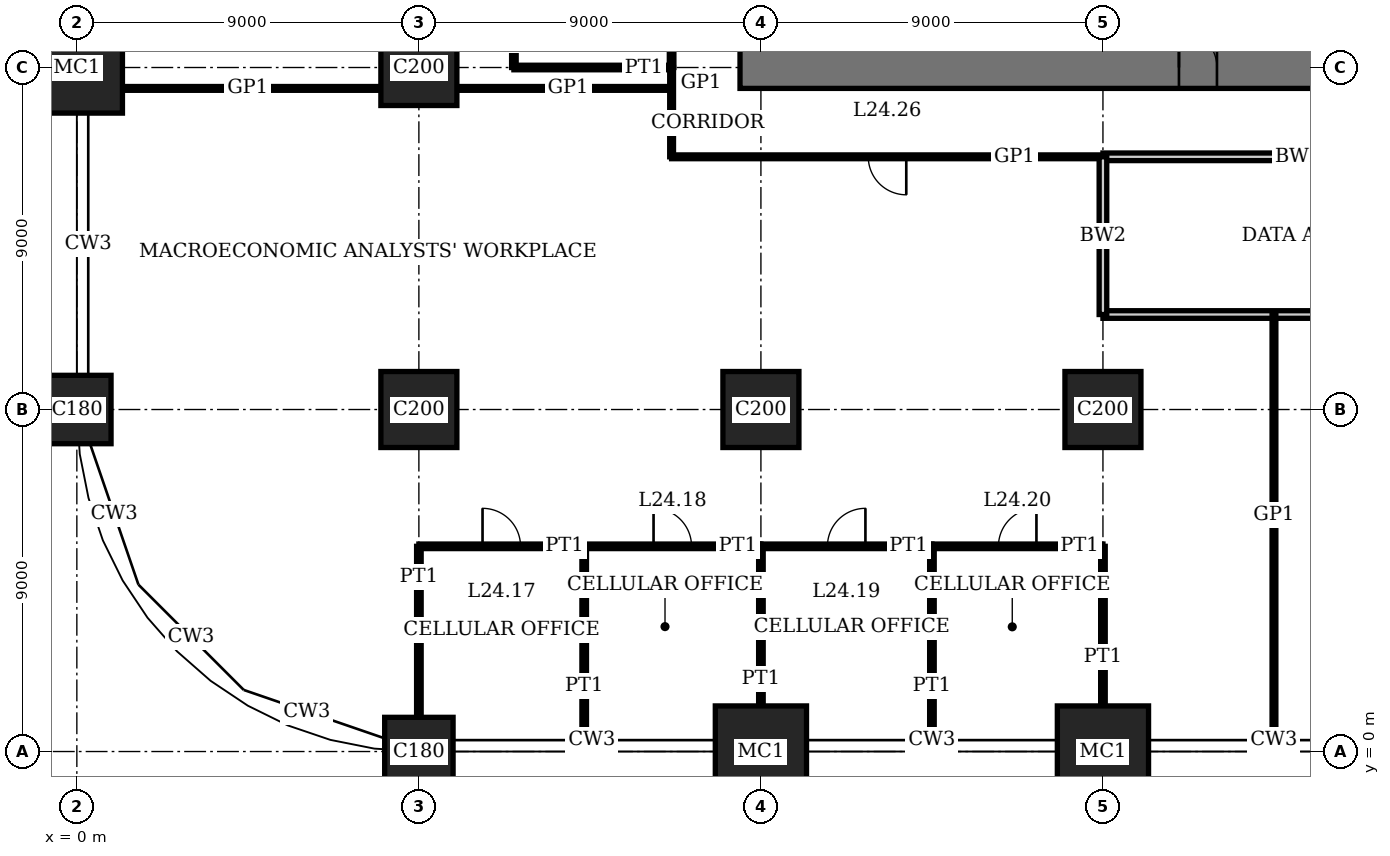
"""IFC4 building model, lengths in metres.
Left out: names, types, materials, properties, quantities, classifications, styles, units other than length and angle.
Written with IfcOpenShell. Run it as: python <this file> out.ifc"""

import sys

from ifc_helpers import new_model, si_unit, direction, frame, frame_2d, origin, origin_2d, place, context, subcontext, project, spatial, rectangle, extrude, element, fill, save


model = new_model("IFC4")
c1 = context("Model", 3, precision=1e-05, world=origin(), true_north=direction((0.0, 1.0)))
c2 = subcontext(c1, "Body", "Model", "MODEL_VIEW")
j1 = project(units=[si_unit("LENGTHUNIT", "METRE"), si_unit("PLANEANGLEUNIT", "RADIAN")], contexts=[c1])
p1 = place(None, origin())
s1 = spatial("IfcSite", under=j1, at=p1, CompositionType="ELEMENT")
p2 = place(p1, origin())
s2 = spatial("IfcBuilding", under=s1, at=p2, CompositionType="ELEMENT")
p3 = place(p2, frame((0.0, 0.0, 101.0)))
s3 = spatial("IfcBuildingStorey", under=s2, at=p3, CompositionType="ELEMENT", Elevation=101.0)
p4 = place(p3, frame((0.0, 9.0, 0.0), z_axis=(0.0, 0.0, 1.0), x_axis=(1.0, 0.0, 0.0)))
e1 = element("IfcColumn", 1, at=p4, inside=s3, PredefinedType="COLUMN", context=c2, shape_type="SweptSolid", body=[
    extrude(rectangle(XDim=1.8, YDim=1.8, at=origin_2d()), origin(), (0.0, 0.0, 1.0), 4.0),
])
p5 = place(p3, frame((0.0, 18.0, 0.0), z_axis=(0.0, 0.0, 1.0), x_axis=(1.0, 0.0, 0.0)))
e2 = element("IfcColumn", 2, at=p5, inside=s3, PredefinedType="COLUMN", context=c2, shape_type="SweptSolid", body=[
    extrude(rectangle(XDim=2.4, YDim=2.4, at=origin_2d()), origin(), (0.0, 0.0, 1.0), 4.0),
])
p6 = place(p3, frame((9.0, 0.0, 0.0), z_axis=(0.0, 0.0, 1.0), x_axis=(1.0, 0.0, 0.0)))
e3 = element("IfcColumn", 3, at=p6, inside=s3, PredefinedType="COLUMN", context=c2, shape_type="SweptSolid", body=[
    extrude(rectangle(XDim=1.8, YDim=1.8, at=origin_2d()), origin(), (0.0, 0.0, 1.0), 4.0),
])
for number, where, z_axis, x_axis in (
    (4, (9.0, 9.0, 0.0), (0.0, 0.0, 1.0), (1.0, 0.0, 0.0)),
    (5, (9.0, 18.0, 0.0), (0.0, 0.0, 1.0), (1.0, 0.0, 0.0)),
):
    element("IfcColumn", number, at=place(p3, frame(where, z_axis=z_axis, x_axis=x_axis)), inside=s3, PredefinedType="COLUMN", context=c2, shape_type="SweptSolid", body=[
        extrude(rectangle(XDim=2.0, YDim=2.0, at=origin_2d()), origin(), (0.0, 0.0, 1.0), 4.0),
    ])
p7 = place(p3, frame((18.0, 0.0, 0.0), z_axis=(0.0, 0.0, 1.0), x_axis=(1.0, 0.0, 0.0)))
e6 = element("IfcColumn", 6, at=p7, inside=s3, PredefinedType="COLUMN", context=c2, shape_type="SweptSolid", body=[
    extrude(rectangle(XDim=2.4, YDim=2.4, at=origin_2d()), origin(), (0.0, 0.0, 1.0), 4.0),
])
p8 = place(p3, frame((18.0, 9.0, 0.0), z_axis=(0.0, 0.0, 1.0), x_axis=(1.0, 0.0, 0.0)))
e7 = element("IfcColumn", 7, at=p8, inside=s3, PredefinedType="COLUMN", context=c2, shape_type="SweptSolid", body=[
    extrude(rectangle(XDim=2.0, YDim=2.0, at=origin_2d()), origin(), (0.0, 0.0, 1.0), 4.0),
])
p9 = place(p3, frame((27.0, 0.0, 0.0), z_axis=(0.0, 0.0, 1.0), x_axis=(1.0, 0.0, 0.0)))
e8 = element("IfcColumn", 8, at=p9, inside=s3, PredefinedType="COLUMN", context=c2, shape_type="SweptSolid", body=[
    extrude(rectangle(XDim=2.4, YDim=2.4, at=origin_2d()), origin(), (0.0, 0.0, 1.0), 4.0),
])
p10 = place(p3, frame((27.0, 9.0, 0.0), z_axis=(0.0, 0.0, 1.0), x_axis=(1.0, 0.0, 0.0)))
e9 = element("IfcColumn", 9, at=p10, inside=s3, PredefinedType="COLUMN", context=c2, shape_type="SweptSolid", body=[
    extrude(rectangle(XDim=2.0, YDim=2.0, at=origin_2d()), origin(), (0.0, 0.0, 1.0), 4.0),
])
p11 = place(p3, frame((17.45, 18.0, 0.0), z_axis=(0.0, 0.0, 1.0), x_axis=(1.0, 0.0, 0.0)))
e10 = element("IfcWall", 10, at=p11, inside=s3, PredefinedType="SHEAR", context=c2, shape_type="SweptSolid", body=[
    extrude(rectangle(XDim=28.1, YDim=1.1, at=frame_2d((14.05, 0.0))), origin(), (0.0, 0.0, 1.0), 4.0),
])
p12 = place(p11, frame((11.55, 0.0, 0.0)))
e11 = element("IfcOpeningElement", 11, at=p12, cuts=e10, PredefinedType="OPENING", context=c2, shape_type="SweptSolid", body=[
    extrude(rectangle(XDim=1.0, YDim=2.4, at=frame_2d((0.5, 1.2))), frame((0.0, 0.56, 0.0), z_axis=(0.0, -1.0, 0.0), x_axis=(1.0, 0.0, 0.0)), (0.0, 0.0, 1.0), 1.12),
])
p13 = place(p11, frame((16.55, 0.0, 0.0)))
e12 = element("IfcOpeningElement", 12, at=p13, cuts=e10, PredefinedType="OPENING", context=c2, shape_type="SweptSolid", body=[
    extrude(rectangle(XDim=1.0, YDim=2.4, at=frame_2d((0.5, 1.2))), frame((0.0, 0.56, 0.0), z_axis=(0.0, -1.0, 0.0), x_axis=(1.0, 0.0, 0.0)), (0.0, 0.0, 1.0), 1.12),
])
p14 = place(p11, frame((20.0, 0.0, 0.0)))
e13 = element("IfcOpeningElement", 13, at=p14, cuts=e10, PredefinedType="OPENING", context=c2, shape_type="SweptSolid", body=[
    extrude(rectangle(XDim=1.1, YDim=2.4, at=frame_2d((0.55, 1.2))), frame((0.0, 0.56, 0.0), z_axis=(0.0, -1.0, 0.0), x_axis=(1.0, 0.0, 0.0)), (0.0, 0.0, 1.0), 1.12),
])
p15 = place(p11, frame((24.05, 0.0, 0.0)))
e14 = element("IfcOpeningElement", 14, at=p15, cuts=e10, PredefinedType="OPENING", context=c2, shape_type="SweptSolid", body=[
    extrude(rectangle(XDim=1.0, YDim=2.4, at=frame_2d((0.5, 1.2))), frame((0.0, 0.56, 0.0), z_axis=(0.0, -1.0, 0.0), x_axis=(1.0, 0.0, 0.0)), (0.0, 0.0, 1.0), 1.12),
])
p16 = place(p3, frame((9.0, 5.4, 0.0), z_axis=(0.0, 0.0, 1.0), x_axis=(1.0, 0.0, 0.0)))
e15 = element("IfcWall", 15, at=p16, inside=s3, PredefinedType="PARTITIONING", context=c2, shape_type="SweptSolid", body=[
    extrude(rectangle(XDim=4.35, YDim=0.12, at=frame_2d((2.175, 0.0))), origin(), (0.0, 0.0, 1.0), 3.75),
])
p17 = place(p16, frame((1.675, 0.0, 0.0)))
e16 = element("IfcOpeningElement", 16, at=p17, cuts=e15, PredefinedType="OPENING", context=c2, shape_type="SweptSolid", body=[
    extrude(rectangle(XDim=1.0, YDim=2.4, at=frame_2d((0.5, 1.2))), frame((0.0, 0.07, 0.0), z_axis=(0.0, -1.0, 0.0), x_axis=(1.0, 0.0, 0.0)), (0.0, 0.0, 1.0), 0.14),
])
p18 = place(p3, frame((13.35, 5.4, 0.0), z_axis=(0.0, 0.0, 1.0), x_axis=(1.0, 0.0, 0.0)))
e17 = element("IfcWall", 17, at=p18, inside=s3, PredefinedType="PARTITIONING", context=c2, shape_type="SweptSolid", body=[
    extrude(rectangle(XDim=4.65, YDim=0.12, at=frame_2d((2.325, 0.0))), origin(), (0.0, 0.0, 1.0), 3.75),
])
p19 = place(p18, frame((1.825, 0.0, 0.0)))
e18 = element("IfcOpeningElement", 18, at=p19, cuts=e17, PredefinedType="OPENING", context=c2, shape_type="SweptSolid", body=[
    extrude(rectangle(XDim=1.0, YDim=2.4, at=frame_2d((0.5, 1.2))), frame((0.0, 0.07, 0.0), z_axis=(0.0, -1.0, 0.0), x_axis=(1.0, 0.0, 0.0)), (0.0, 0.0, 1.0), 0.14),
])
p20 = place(p3, frame((18.0, 5.4, 0.0), z_axis=(0.0, 0.0, 1.0), x_axis=(1.0, 0.0, 0.0)))
e19 = element("IfcWall", 19, at=p20, inside=s3, PredefinedType="PARTITIONING", context=c2, shape_type="SweptSolid", body=[
    extrude(rectangle(XDim=4.5, YDim=0.12, at=frame_2d((2.25, 0.0))), origin(), (0.0, 0.0, 1.0), 3.75),
])
p21 = place(p20, frame((1.75, 0.0, 0.0)))
e20 = element("IfcOpeningElement", 20, at=p21, cuts=e19, PredefinedType="OPENING", context=c2, shape_type="SweptSolid", body=[
    extrude(rectangle(XDim=1.0, YDim=2.4, at=frame_2d((0.5, 1.2))), frame((0.0, 0.07, 0.0), z_axis=(0.0, -1.0, 0.0), x_axis=(1.0, 0.0, 0.0)), (0.0, 0.0, 1.0), 0.14),
])
p22 = place(p3, frame((22.5, 5.4, 0.0), z_axis=(0.0, 0.0, 1.0), x_axis=(1.0, 0.0, 0.0)))
e21 = element("IfcWall", 21, at=p22, inside=s3, PredefinedType="PARTITIONING", context=c2, shape_type="SweptSolid", body=[
    extrude(rectangle(XDim=4.5, YDim=0.12, at=frame_2d((2.25, 0.0))), origin(), (0.0, 0.0, 1.0), 3.75),
])
p23 = place(p22, frame((1.75, 0.0, 0.0)))
e22 = element("IfcOpeningElement", 22, at=p23, cuts=e21, PredefinedType="OPENING", context=c2, shape_type="SweptSolid", body=[
    extrude(rectangle(XDim=1.0, YDim=2.4, at=frame_2d((0.5, 1.2))), frame((0.0, 0.07, 0.0), z_axis=(0.0, -1.0, 0.0), x_axis=(1.0, 0.0, 0.0)), (0.0, 0.0, 1.0), 0.14),
])
p24 = place(p3, frame((27.0, 11.5, 0.0), z_axis=(0.0, 0.0, 1.0), x_axis=(1.0, 0.0, 0.0)))
e23 = element("IfcWall", 23, at=p24, inside=s3, PredefinedType="SOLIDWALL", context=c2, shape_type="SweptSolid", body=[
    extrude(rectangle(XDim=13.5, YDim=0.2, at=frame_2d((6.75, 0.0))), origin(), (0.0, 0.0, 1.0), 3.75),
])
p25 = place(p24, frame((6.25, 0.0, 0.0)))
e24 = element("IfcOpeningElement", 24, at=p25, cuts=e23, PredefinedType="OPENING", context=c2, shape_type="SweptSolid", body=[
    extrude(rectangle(XDim=1.0, YDim=2.4, at=frame_2d((0.5, 1.2))), frame((0.0, 0.11, 0.0), z_axis=(0.0, -1.0, 0.0), x_axis=(1.0, 0.0, 0.0)), (0.0, 0.0, 1.0), 0.22),
])
p26 = place(p3, frame((27.0, 15.65, 0.0), z_axis=(0.0, 0.0, 1.0), x_axis=(1.0, 0.0, 0.0)))
e25 = element("IfcWall", 25, at=p26, inside=s3, PredefinedType="SOLIDWALL", context=c2, shape_type="SweptSolid", body=[
    extrude(rectangle(XDim=13.5, YDim=0.2, at=frame_2d((6.75, 0.0))), origin(), (0.0, 0.0, 1.0), 3.75),
])
p27 = place(p3, frame((15.65, 15.65, 0.0), z_axis=(0.0, 0.0, 1.0), x_axis=(1.0, 0.0, 0.0)))
e26 = element("IfcWall", 26, at=p27, inside=s3, PredefinedType="PARTITIONING", context=c2, shape_type="SweptSolid", body=[
    extrude(rectangle(XDim=11.35, YDim=0.1, at=frame_2d((5.675, 0.0))), origin(), (0.0, 0.0, 1.0), 3.75),
])
p28 = place(p27, frame((5.175, 0.0, 0.0)))
e27 = element("IfcOpeningElement", 27, at=p28, cuts=e26, PredefinedType="OPENING", context=c2, shape_type="SweptSolid", body=[
    extrude(rectangle(XDim=1.0, YDim=2.4, at=frame_2d((0.5, 1.2))), frame((0.0, 0.06, 0.0), z_axis=(0.0, -1.0, 0.0), x_axis=(1.0, 0.0, 0.0)), (0.0, 0.0, 1.0), 0.12),
])
p29 = place(p3, frame((1.2, 17.45, 0.0), z_axis=(0.0, 0.0, 1.0), x_axis=(1.0, 0.0, 0.0)))
e28 = element("IfcWall", 28, at=p29, inside=s3, PredefinedType="PARTITIONING", context=c2, shape_type="SweptSolid", body=[
    extrude(rectangle(XDim=6.8, YDim=0.1, at=frame_2d((3.4, 0.0))), origin(), (0.0, 0.0, 1.0), 3.75),
])
p30 = place(p3, frame((10.0, 17.45, 0.0), z_axis=(0.0, 0.0, 1.0), x_axis=(1.0, 0.0, 0.0)))
e29 = element("IfcWall", 29, at=p30, inside=s3, PredefinedType="PARTITIONING", context=c2, shape_type="SweptSolid", body=[
    extrude(rectangle(XDim=5.65, YDim=0.1, at=frame_2d((2.825, 0.0))), origin(), (0.0, 0.0, 1.0), 3.75),
])
p31 = place(p3, frame((11.5, 18.0, 0.0), z_axis=(0.0, 0.0, 1.0), x_axis=(1.0, 0.0, 0.0)))
e30 = element("IfcWall", 30, at=p31, inside=s3, PredefinedType="PARTITIONING", context=c2, shape_type="SweptSolid", body=[
    extrude(rectangle(XDim=4.15, YDim=0.12, at=frame_2d((2.075, 0.0))), origin(), (0.0, 0.0, 1.0), 3.05),
])
p32 = place(p3, frame((9.0, 0.9, 0.0), z_axis=(0.0, 0.0, 1.0), x_axis=(0.0, 1.0, 0.0)))
e31 = element("IfcWall", 31, at=p32, inside=s3, PredefinedType="PARTITIONING", context=c2, shape_type="SweptSolid", body=[
    extrude(rectangle(XDim=4.5, YDim=0.12, at=frame_2d((2.25, 0.0))), origin(), (0.0, 0.0, 1.0), 3.05),
])
p33 = place(p3, frame((11.5, 18.0, 0.0), z_axis=(0.0, 0.0, 1.0), x_axis=(0.0, 1.0, 0.0)))
e32 = element("IfcWall", 32, at=p33, inside=s3, PredefinedType="PARTITIONING", context=c2, shape_type="SweptSolid", body=[
    extrude(rectangle(XDim=4.5, YDim=0.12, at=frame_2d((2.25, 0.0))), origin(), (0.0, 0.0, 1.0), 3.75),
])
p34 = place(p33, frame((1.75, 0.0, 0.0)))
e33 = element("IfcOpeningElement", 33, at=p34, cuts=e32, PredefinedType="OPENING", context=c2, shape_type="SweptSolid", body=[
    extrude(rectangle(XDim=1.0, YDim=2.4, at=frame_2d((0.5, 1.2))), frame((0.0, 0.07, 0.0), z_axis=(0.0, -1.0, 0.0), x_axis=(1.0, 0.0, 0.0)), (0.0, 0.0, 1.0), 0.14),
])
p35 = place(p3, frame((13.35, 0.31, 0.0), z_axis=(0.0, 0.0, 1.0), x_axis=(0.0, 1.0, 0.0)))
e34 = element("IfcWall", 34, at=p35, inside=s3, PredefinedType="PARTITIONING", context=c2, shape_type="SweptSolid", body=[
    extrude(rectangle(XDim=5.09, YDim=0.12, at=frame_2d((2.545, 0.0))), origin(), (0.0, 0.0, 1.0), 3.75),
])
p36 = place(p3, frame((15.65, 18.0, 0.0), z_axis=(0.0, 0.0, 1.0), x_axis=(0.0, 1.0, 0.0)))
e35 = element("IfcWall", 35, at=p36, inside=s3, PredefinedType="PARTITIONING", context=c2, shape_type="SweptSolid", body=[
    extrude(rectangle(XDim=4.5, YDim=0.12, at=frame_2d((2.25, 0.0))), origin(), (0.0, 0.0, 1.0), 3.75),
])
p37 = place(p3, frame((15.65, 15.65, 0.0), z_axis=(0.0, 0.0, 1.0), x_axis=(0.0, 1.0, 0.0)))
e36 = element("IfcWall", 36, at=p37, inside=s3, PredefinedType="PARTITIONING", context=c2, shape_type="SweptSolid", body=[
    extrude(rectangle(XDim=2.35, YDim=0.1, at=frame_2d((1.175, 0.0))), origin(), (0.0, 0.0, 1.0), 3.75),
])
p38 = place(p3, frame((18.0, 1.2, 0.0), z_axis=(0.0, 0.0, 1.0), x_axis=(0.0, 1.0, 0.0)))
e37 = element("IfcWall", 37, at=p38, inside=s3, PredefinedType="PARTITIONING", context=c2, shape_type="SweptSolid", body=[
    extrude(rectangle(XDim=4.2, YDim=0.12, at=frame_2d((2.1, 0.0))), origin(), (0.0, 0.0, 1.0), 3.05),
])
p39 = place(p3, frame((22.5, 0.31, 0.0), z_axis=(0.0, 0.0, 1.0), x_axis=(0.0, 1.0, 0.0)))
e38 = element("IfcWall", 38, at=p39, inside=s3, PredefinedType="PARTITIONING", context=c2, shape_type="SweptSolid", body=[
    extrude(rectangle(XDim=5.09, YDim=0.12, at=frame_2d((2.545, 0.0))), origin(), (0.0, 0.0, 1.0), 3.75),
])
p40 = place(p3, frame((27.0, 11.5, 0.0), z_axis=(0.0, 0.0, 1.0), x_axis=(0.0, 1.0, 0.0)))
e39 = element("IfcWall", 39, at=p40, inside=s3, PredefinedType="SOLIDWALL", context=c2, shape_type="SweptSolid", body=[
    extrude(rectangle(XDim=4.15, YDim=0.2, at=frame_2d((2.075, 0.0))), origin(), (0.0, 0.0, 1.0), 3.05),
])
p41 = place(p3, frame((27.0, 1.2, 0.0), z_axis=(0.0, 0.0, 1.0), x_axis=(0.0, 1.0, 0.0)))
e40 = element("IfcWall", 40, at=p41, inside=s3, PredefinedType="PARTITIONING", context=c2, shape_type="SweptSolid", body=[
    extrude(rectangle(XDim=4.2, YDim=0.12, at=frame_2d((2.1, 0.0))), origin(), (0.0, 0.0, 1.0), 3.05),
])
p42 = place(p3, frame((31.5, 0.31, 0.0), z_axis=(0.0, 0.0, 1.0), x_axis=(0.0, 1.0, 0.0)))
e41 = element("IfcWall", 41, at=p42, inside=s3, PredefinedType="PARTITIONING", context=c2, shape_type="SweptSolid", body=[
    extrude(rectangle(XDim=11.2, YDim=0.1, at=frame_2d((5.6, 0.0))), origin(), (0.0, 0.0, 1.0), 3.75),
])
p43 = place(p12, origin())
e42 = element("IfcDoor", 42, at=p43, inside=s3, OperationType="SINGLE_SWING_RIGHT", PredefinedType="DOOR", context=c2, shape_type="SweptSolid", body=[
    extrude(rectangle(XDim=1.0, YDim=2.4, at=frame_2d((0.5, 1.2))), frame((0.0, 0.025, 0.0), z_axis=(0.0, -1.0, 0.0), x_axis=(1.0, 0.0, 0.0)), (0.0, 0.0, 1.0), 0.05),
    extrude(rectangle(XDim=0.04, YDim=2.4, at=frame_2d((0.02, 1.2))), frame((0.0, 0.4, 0.0), z_axis=(0.0, -1.0, 0.0), x_axis=(1.0, 0.0, 0.0)), (0.0, 0.0, 1.0), 0.8),
    extrude(rectangle(XDim=0.04, YDim=2.4, at=frame_2d((0.98, 1.2))), frame((0.0, 0.4, 0.0), z_axis=(0.0, -1.0, 0.0), x_axis=(1.0, 0.0, 0.0)), (0.0, 0.0, 1.0), 0.8),
    extrude(rectangle(XDim=1.0, YDim=0.04, at=frame_2d((0.5, 2.38))), frame((0.0, 0.4, 0.0), z_axis=(0.0, -1.0, 0.0), x_axis=(1.0, 0.0, 0.0)), (0.0, 0.0, 1.0), 0.8),
])
fill(e11, e42)
p44 = place(p17, origin())
e43 = element("IfcDoor", 43, at=p44, inside=s3, OperationType="SINGLE_SWING_RIGHT", PredefinedType="DOOR", context=c2, shape_type="SweptSolid", body=[
    extrude(rectangle(XDim=1.0, YDim=2.4, at=frame_2d((0.5, 1.2))), frame((0.0, 0.025, 0.0), z_axis=(0.0, -1.0, 0.0), x_axis=(1.0, 0.0, 0.0)), (0.0, 0.0, 1.0), 0.05),
])
fill(e16, e43)
p45 = place(p19, origin())
e44 = element("IfcDoor", 44, at=p45, inside=s3, OperationType="SINGLE_SWING_RIGHT", PredefinedType="DOOR", context=c2, shape_type="SweptSolid", body=[
    extrude(rectangle(XDim=1.0, YDim=2.4, at=frame_2d((0.5, 1.2))), frame((0.0, 0.025, 0.0), z_axis=(0.0, -1.0, 0.0), x_axis=(1.0, 0.0, 0.0)), (0.0, 0.0, 1.0), 0.05),
])
fill(e18, e44)
p46 = place(p21, origin())
e45 = element("IfcDoor", 45, at=p46, inside=s3, OperationType="SINGLE_SWING_LEFT", PredefinedType="DOOR", context=c2, shape_type="SweptSolid", body=[
    extrude(rectangle(XDim=1.0, YDim=2.4, at=frame_2d((0.5, 1.2))), frame((0.0, 0.025, 0.0), z_axis=(0.0, -1.0, 0.0), x_axis=(1.0, 0.0, 0.0)), (0.0, 0.0, 1.0), 0.05),
])
fill(e20, e45)
p47 = place(p23, origin())
e46 = element("IfcDoor", 46, at=p47, inside=s3, OperationType="SINGLE_SWING_LEFT", PredefinedType="DOOR", context=c2, shape_type="SweptSolid", body=[
    extrude(rectangle(XDim=1.0, YDim=2.4, at=frame_2d((0.5, 1.2))), frame((0.0, 0.025, 0.0), z_axis=(0.0, -1.0, 0.0), x_axis=(1.0, 0.0, 0.0)), (0.0, 0.0, 1.0), 0.05),
])
fill(e22, e46)
p48 = place(p28, origin())
e47 = element("IfcDoor", 47, at=p48, inside=s3, OperationType="SINGLE_SWING_RIGHT", PredefinedType="DOOR", context=c2, shape_type="SweptSolid", body=[
    extrude(rectangle(XDim=1.0, YDim=2.4, at=frame_2d((0.5, 1.2))), frame((0.0, 0.02, 0.0), z_axis=(0.0, -1.0, 0.0), x_axis=(1.0, 0.0, 0.0)), (0.0, 0.0, 1.0), 0.04),
])
fill(e27, e47)
save(model, sys.argv[1])
